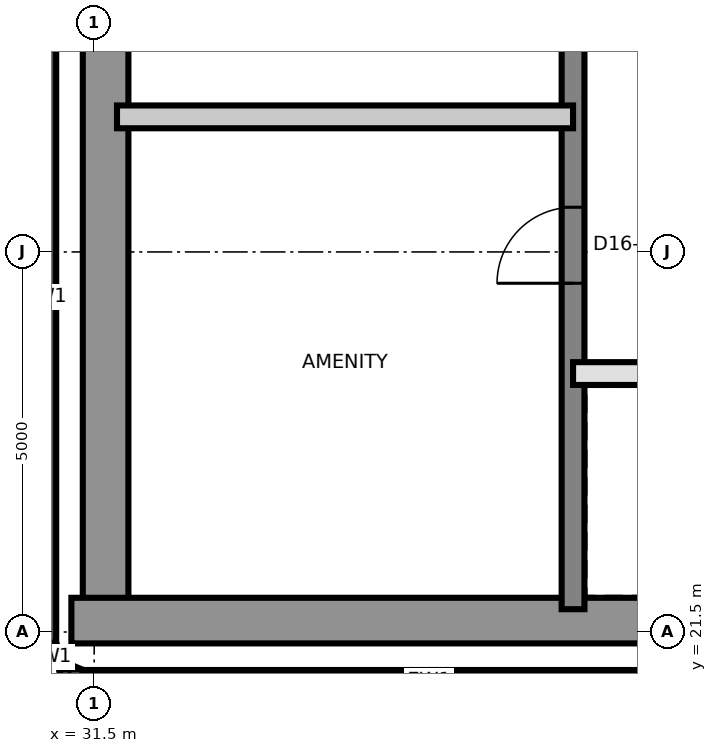
"""IFC4 building model, lengths in metres.
Left out: names, types, materials, properties, quantities, classifications, styles, units other than length and angle.
Written with IfcOpenShell. Run it as: python <this file> out.ifc"""

import sys

from ifc_helpers import new_model, si_unit, direction, frame, frame_2d, origin, place, context, subcontext, project, spatial, rectangle, extrude, element, fill, save


model = new_model("IFC4")
c1 = context("Model", 3, precision=1e-05, world=origin(), true_north=direction((0.0, 1.0)))
c2 = subcontext(c1, "Body", "Model", "MODEL_VIEW")
j1 = project(units=[si_unit("LENGTHUNIT", "METRE"), si_unit("PLANEANGLEUNIT", "RADIAN")], contexts=[c1])
p1 = place(None, origin())
s1 = spatial("IfcSite", under=j1, at=p1, CompositionType="ELEMENT")
p2 = place(p1, origin())
s2 = spatial("IfcBuilding", under=s1, at=p2, CompositionType="ELEMENT")
p3 = place(p2, frame((0.0, 0.0, 160.7)))
s3 = spatial("IfcBuildingStorey", under=s2, at=p3, CompositionType="ELEMENT", Elevation=160.7)
p4 = place(p3, frame((31.65, 21.8, 0.0), z_axis=(0.0, 0.0, 1.0), x_axis=(0.0, 1.0, 0.0)))
e1 = element("IfcWall", 1, at=p4, inside=s3, PredefinedType="SHEAR", context=c2, shape_type="SweptSolid", body=[
    extrude(rectangle(XDim=17.4, YDim=0.6, at=frame_2d((8.7, 0.0))), origin(), (0.0, 0.0, 1.0), 3.7),
])
p5 = place(p3, frame((31.2, 21.65, 0.0), z_axis=(0.0, 0.0, 1.0), x_axis=(1.0, 0.0, 0.0)))
e2 = element("IfcWall", 2, at=p5, inside=s3, PredefinedType="SHEAR", context=c2, shape_type="SweptSolid", body=[
    extrude(rectangle(XDim=27.0, YDim=0.6, at=frame_2d((13.5, 0.0))), origin(), (0.0, 0.0, 1.0), 3.7),
])
p6 = place(p3, frame((37.8, 21.8, 0.0), z_axis=(0.0, 0.0, 1.0), x_axis=(0.0, 1.0, 0.0)))
e3 = element("IfcWall", 3, at=p6, inside=s3, PredefinedType="SHEAR", context=c2, shape_type="SweptSolid", body=[
    extrude(rectangle(XDim=8.7, YDim=0.3, at=frame_2d((4.35, 0.0))), origin(), (0.0, 0.0, 1.0), 3.7),
])
p7 = place(p6, frame((4.288, 0.0, 0.0)))
e4 = element("IfcOpeningElement", 4, at=p7, cuts=e3, PredefinedType="OPENING", context=c2, shape_type="SweptSolid", body=[
    extrude(rectangle(XDim=1.0, YDim=2.1, at=frame_2d((0.5, 1.05))), frame((0.0, 0.16, 0.0), z_axis=(0.0, -1.0, 0.0), x_axis=(1.0, 0.0, 0.0)), (0.0, 0.0, 1.0), 0.32),
])
p8 = place(p3, frame((30.85, 30.454, 0.0), z_axis=(0.0, 0.0, 1.0), x_axis=(0.0, -1.0, 0.0)))
e5 = element("IfcWall", 5, at=p8, inside=s3, PredefinedType="SOLIDWALL", context=c2, shape_type="SweptSolid", body=[
    extrude(rectangle(XDim=9.094, YDim=0.3, at=frame_2d((4.547, 0.0))), origin(), (0.0, 0.0, 1.0), 3.4),
])
for number, where, z_axis, x_axis in (
    (6, (30.861, 21.302, 0.0), (0.0, 0.0, 1.0), (0.383, -0.924, 0.0)),
    (7, (31.048, 20.967, 0.0), (0.0, 0.0, 1.0), (0.924, -0.383, 0.0)),
):
    element("IfcWall", number, at=place(p3, frame(where, z_axis=z_axis, x_axis=x_axis)), inside=s3, PredefinedType="SOLIDWALL", context=c2, shape_type="SweptSolid", body=[
        extrude(rectangle(XDim=0.275, YDim=0.3, at=frame_2d((0.138, 0.0))), origin(), (0.0, 0.0, 1.0), 3.4),
    ])
p9 = place(p3, frame((31.36, 20.85, 0.0), z_axis=(0.0, 0.0, 1.0), x_axis=(1.0, 0.0, 0.0)))
e8 = element("IfcWall", 8, at=p9, inside=s3, PredefinedType="SOLIDWALL", context=c2, shape_type="SweptSolid", body=[
    extrude(rectangle(XDim=9.094, YDim=0.3, at=frame_2d((4.547, 0.0))), origin(), (0.0, 0.0, 1.0), 3.4),
])
p10 = place(p3, frame((37.8, 24.9, 0.0), z_axis=(0.0, 0.0, 1.0), x_axis=(1.0, 0.0, 0.0)))
e9 = element("IfcWall", 9, at=p10, inside=s3, PredefinedType="SOLIDWALL", context=c2, shape_type="SweptSolid", body=[
    extrude(rectangle(XDim=12.0, YDim=0.3, at=frame_2d((6.0, 0.0))), origin(), (0.0, 0.0, 1.0), 3.4),
])
p11 = place(p10, frame((1.05, 0.0, 0.0)))
e10 = element("IfcOpeningElement", 10, at=p11, cuts=e9, PredefinedType="OPENING", context=c2, shape_type="SweptSolid", body=[
    extrude(rectangle(XDim=0.9, YDim=2.1, at=frame_2d((0.45, 1.05))), frame((0.0, 0.16, 0.0), z_axis=(0.0, -1.0, 0.0), x_axis=(1.0, 0.0, 0.0)), (0.0, 0.0, 1.0), 0.32),
])
p12 = place(p10, frame((10.05, 0.0, 0.0)))
e11 = element("IfcOpeningElement", 11, at=p12, cuts=e9, PredefinedType="OPENING", context=c2, shape_type="SweptSolid", body=[
    extrude(rectangle(XDim=0.9, YDim=2.1, at=frame_2d((0.45, 1.05))), frame((0.0, 0.16, 0.0), z_axis=(0.0, -1.0, 0.0), x_axis=(1.0, 0.0, 0.0)), (0.0, 0.0, 1.0), 0.32),
])
p13 = place(p10, frame((3.95, 0.0, 0.0)))
e12 = element("IfcOpeningElement", 12, at=p13, cuts=e9, PredefinedType="OPENING", context=c2, shape_type="SweptSolid", body=[
    extrude(rectangle(XDim=1.1, YDim=2.4, at=frame_2d((0.55, 1.2))), frame((0.0, 0.16, 0.0), z_axis=(0.0, -1.0, 0.0), x_axis=(1.0, 0.0, 0.0)), (0.0, 0.0, 1.0), 0.32),
])
p14 = place(p10, frame((6.95, 0.0, 0.0)))
e13 = element("IfcOpeningElement", 13, at=p14, cuts=e9, PredefinedType="OPENING", context=c2, shape_type="SweptSolid", body=[
    extrude(rectangle(XDim=1.1, YDim=2.4, at=frame_2d((0.55, 1.2))), frame((0.0, 0.16, 0.0), z_axis=(0.0, -1.0, 0.0), x_axis=(1.0, 0.0, 0.0)), (0.0, 0.0, 1.0), 0.32),
])
p15 = place(p3, frame((31.8, 28.277, 0.0), z_axis=(0.0, 0.0, 1.0), x_axis=(1.0, 0.0, 0.0)))
e14 = element("IfcWall", 14, at=p15, inside=s3, PredefinedType="PARTITIONING", context=c2, shape_type="SweptSolid", body=[
    extrude(rectangle(XDim=6.0, YDim=0.3, at=frame_2d((3.0, 0.0))), origin(), (0.0, 0.0, 1.0), 3.4),
])
p16 = place(p7, origin())
e15 = element("IfcDoor", 15, at=p16, inside=s3, OperationType="SINGLE_SWING_RIGHT", PredefinedType="DOOR", context=c2, shape_type="SweptSolid", body=[
    extrude(rectangle(XDim=1.0, YDim=2.1, at=frame_2d((0.5, 1.05))), frame((0.0, 0.025, 0.0), z_axis=(0.0, -1.0, 0.0), x_axis=(1.0, 0.0, 0.0)), (0.0, 0.0, 1.0), 0.05),
])
fill(e4, e15)
save(model, sys.argv[1])
